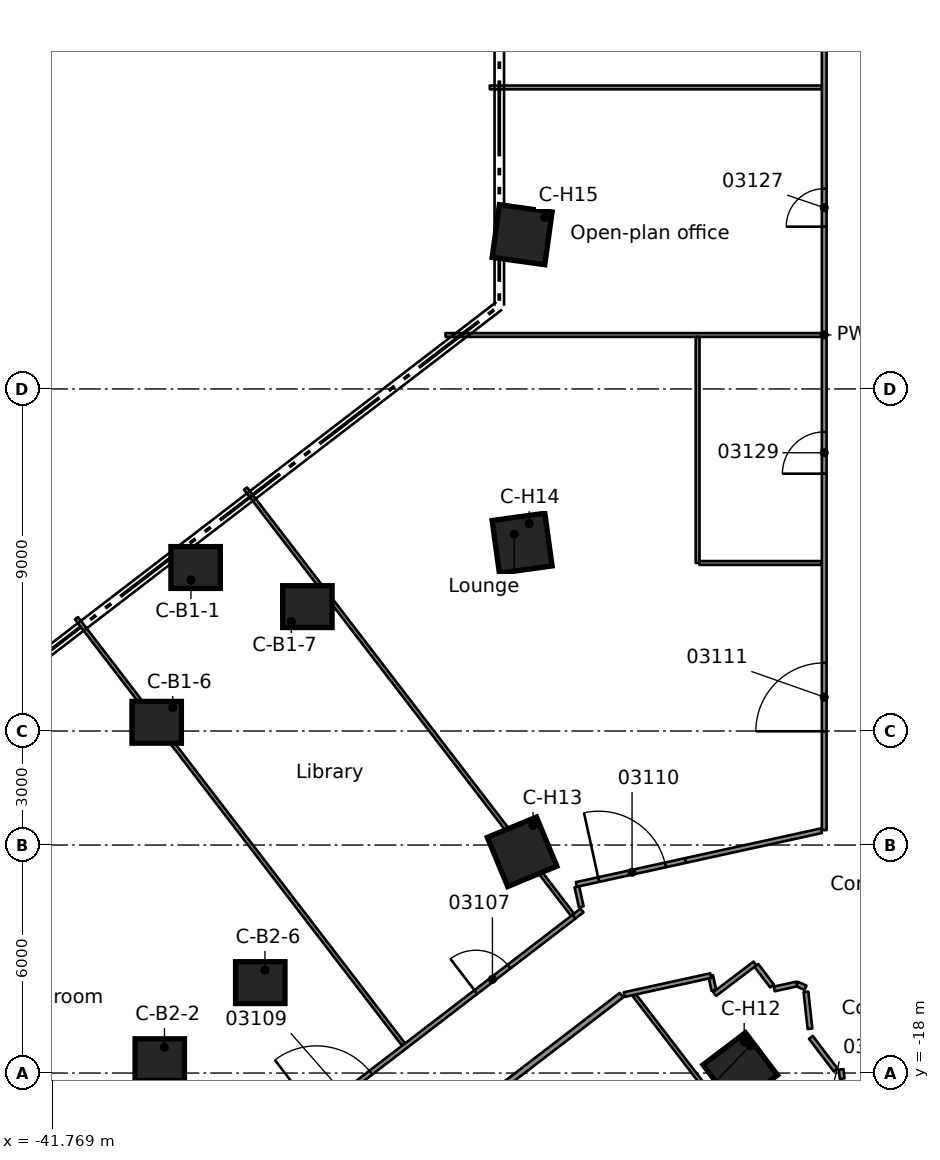
"""IFC4 building model, lengths in metres.
Left out: names, types, materials, properties, quantities, classifications, styles, units other than length and angle.
Written with IfcOpenShell. Run it as: python <this file> out.ifc"""

import sys

from ifc_helpers import new_model, si_unit, direction, frame, frame_2d, origin, origin_2d, place, context, subcontext, project, spatial, rectangle, extrude, element, fill, save


model = new_model("IFC4")
c1 = context("Model", 3, precision=1e-05, world=origin(), true_north=direction((0.0, 1.0)))
c2 = subcontext(c1, "Body", "Model", "MODEL_VIEW")
j1 = project(units=[si_unit("LENGTHUNIT", "METRE"), si_unit("PLANEANGLEUNIT", "RADIAN")], contexts=[c1])
p1 = place(None, origin())
s1 = spatial("IfcSite", under=j1, at=p1, CompositionType="ELEMENT")
p2 = place(p1, origin())
s2 = spatial("IfcBuilding", under=s1, at=p2, CompositionType="ELEMENT")
p3 = place(p2, frame((0.0, 0.0, 15.5)))
s3 = spatial("IfcBuildingStorey", under=s2, at=p3, CompositionType="ELEMENT", Elevation=15.5)
for number, where, z_axis, x_axis in (
    (1, (-37.991, -4.698, 0.0), (0.0, 0.0, 1.0), (1.0, 0.0, 0.0)),
    (2, (-39.016, -8.771, 0.0), (0.0, 0.0, 1.0), (1.0, 0.0, 0.0)),
    (3, (-35.05, -5.727, 0.0), (0.0, 0.0, 1.0), (1.0, 0.0, 0.0)),
    (4, (-38.935, -17.649, 0.0), (0.0, 0.0, 1.0), (1.0, 0.0, 0.0)),
    (5, (-36.29, -15.62, 0.0), (0.0, 0.0, 1.0), (1.0, 0.0, 0.0)),
):
    element("IfcColumn", number, at=place(p3, frame(where, z_axis=z_axis, x_axis=x_axis)), inside=s3, PredefinedType="COLUMN", context=c2, shape_type="SweptSolid", body=[
        extrude(rectangle(XDim=1.3, YDim=1.1, at=origin_2d()), origin(), (0.0, 0.0, 1.0), 5.0),
    ])
for number, where, z_axis, x_axis in (
    (6, (-23.659, -17.919, 0.0), (0.0, 0.0, 1.0), (-0.797, -0.604, 0.0)),
    (7, (-29.4, -12.178, 0.0), (0.0, 0.0, 1.0), (-0.924, -0.383, 0.0)),
    (8, (-29.4, -4.059, 0.0), (0.0, 0.0, 1.0), (-0.991, -0.137, 0.0)),
    (9, (-29.4, 4.059, 0.0), (0.0, 0.0, 1.0), (-0.991, 0.137, 0.0)),
):
    element("IfcColumn", number, at=place(p3, frame(where, z_axis=z_axis, x_axis=x_axis)), inside=s3, PredefinedType="COLUMN", context=c2, shape_type="SweptSolid", body=[
        extrude(rectangle(XDim=1.4, YDim=1.4, at=origin_2d()), origin(), (0.0, 0.0, 1.0), 5.0),
    ])
p4 = place(p3, frame((-21.004, -17.904, 0.0), z_axis=(0.0, 0.0, 1.0), x_axis=(0.105933230141, -0.994373245191, 0.0)))
e10 = element("IfcWall", 10, at=p4, inside=s3, PredefinedType="PARTITIONING", context=c2, shape_type="SweptSolid", body=[
    extrude(rectangle(XDim=0.244, YDim=0.125, at=frame_2d((0.122, 0.0))), origin(), (0.0, 0.0, 1.0), 4.58),
])
p5 = place(p3, frame((-21.931, -15.864, 0.0), z_axis=(0.0, 0.0, 1.0), x_axis=(0.10837572028, -0.99411000561, 0.0)))
e11 = element("IfcWall", 11, at=p5, inside=s3, PredefinedType="PARTITIONING", context=c2, shape_type="SweptSolid", body=[
    extrude(rectangle(XDim=0.978, YDim=0.125, at=frame_2d((0.489, 0.0))), origin(), (0.0, 0.0, 1.0), 4.58),
])
p6 = place(p3, frame((-24.438, -15.437, 0.0), z_axis=(0.0, 0.0, 1.0), x_axis=(0.212096867325, -0.977248647413, 0.0)))
e12 = element("IfcWall", 12, at=p6, inside=s3, PredefinedType="PARTITIONING", context=c2, shape_type="SweptSolid", body=[
    extrude(rectangle(XDim=0.396, YDim=0.125, at=frame_2d((0.198, 0.0))), origin(), (0.0, 0.0, 1.0), 4.58),
])
p7 = place(p3, frame((-27.959, -13.1, 0.0), z_axis=(0.0, 0.0, 1.0), x_axis=(0.215346078447, -0.976537795734, 0.0)))
e13 = element("IfcWall", 13, at=p7, inside=s3, PredefinedType="PARTITIONING", context=c2, shape_type="SweptSolid", body=[
    extrude(rectangle(XDim=0.539, YDim=0.125, at=frame_2d((0.269, 0.0))), origin(), (0.0, 0.0, 1.0), 4.58),
])
p8 = place(p3, frame((-23.234, -15.168, 0.0), z_axis=(0.0, 0.0, 1.0), x_axis=(0.602990949897, -0.797748026849, 0.0)))
e14 = element("IfcWall", 14, at=p8, inside=s3, PredefinedType="PARTITIONING", context=c2, shape_type="SweptSolid", body=[
    extrude(rectangle(XDim=0.678, YDim=0.125, at=frame_2d((0.339, 0.0))), origin(), (0.0, 0.0, 1.0), 4.58),
])
p9 = place(p3, frame((-21.801, -17.061, 0.0), z_axis=(0.0, 0.0, 1.0), x_axis=(0.604123687543, -0.796890563471, 0.0)))
e15 = element("IfcWall", 15, at=p9, inside=s3, PredefinedType="PARTITIONING", context=c2, shape_type="SweptSolid", body=[
    extrude(rectangle(XDim=1.078, YDim=0.125, at=frame_2d((0.539, 0.0))), origin(), (0.0, 0.0, 1.0), 4.58),
])
p10 = place(p3, frame((-41.126, -6.033, 0.0), z_axis=(0.0, 0.0, 1.0), x_axis=(0.608775561638, -0.793342495743, 0.0)))
e16 = element("IfcWall", 16, at=p10, inside=s3, PredefinedType="PARTITIONING", context=c2, shape_type="SweptSolid", body=[
    extrude(rectangle(XDim=14.136, YDim=0.1, at=frame_2d((7.068, 0.0))), origin(), (0.0, 0.0, 1.0), 4.58),
])
p11 = place(p3, frame((-36.678, -2.62, 0.0), z_axis=(0.0, 0.0, 1.0), x_axis=(0.608783902678, -0.793336095132, 0.0)))
e17 = element("IfcWall", 17, at=p11, inside=s3, PredefinedType="PARTITIONING", context=c2, shape_type="SweptSolid", body=[
    extrude(rectangle(XDim=14.136, YDim=0.1, at=frame_2d((7.068, 0.0))), origin(), (0.0, 0.0, 1.0), 4.58),
])
p12 = place(p3, frame((-26.44, -15.962, 0.0), z_axis=(0.0, 0.0, 1.0), x_axis=(0.608697215762, -0.79340260872, 0.0)))
e18 = element("IfcWall", 18, at=p12, inside=s3, PredefinedType="PARTITIONING", context=c2, shape_type="SweptSolid", body=[
    extrude(rectangle(XDim=6.79, YDim=0.1, at=frame_2d((3.395, 0.0))), origin(), (0.0, 0.0, 1.0), 4.58),
])
p13 = place(p3, frame((-22.17, -15.656, 0.0), z_axis=(0.0, 0.0, 1.0), x_axis=(0.914864311429, -0.403761429156, 0.0)))
e19 = element("IfcWall", 19, at=p13, inside=s3, PredefinedType="PARTITIONING", context=c2, shape_type="SweptSolid", body=[
    extrude(rectangle(XDim=0.248, YDim=0.125, at=frame_2d((0.124, 0.0))), origin(), (0.0, 0.0, 1.0), 4.58),
])
p14 = place(p3, frame((-24.732, -4.579, 0.0), z_axis=(0.0, 0.0, 1.0), x_axis=(1.0, 0.0, 0.0)))
e20 = element("IfcWall", 20, at=p14, inside=s3, PredefinedType="PARTITIONING", context=c2, shape_type="SweptSolid", body=[
    extrude(rectangle(XDim=3.22, YDim=0.1, at=frame_2d((1.61, 0.0))), origin(), (0.0, 0.0, 1.0), 4.58),
])
p15 = place(p3, frame((-31.414, 1.42, 0.0), z_axis=(0.0, 0.0, 1.0), x_axis=(1.0, 0.0, 0.0)))
e21 = element("IfcWall", 21, at=p15, inside=s3, PredefinedType="PARTITIONING", context=c2, shape_type="SweptSolid", body=[
    extrude(rectangle(XDim=9.902, YDim=0.1, at=frame_2d((4.951, 0.0))), origin(), (0.0, 0.0, 1.0), 4.58),
])
p16 = place(p3, frame((-30.25, 7.934, 0.0), z_axis=(0.0, 0.0, 1.0), x_axis=(1.0, 0.0, 0.0)))
e22 = element("IfcWall", 22, at=p16, inside=s3, PredefinedType="PARTITIONING", context=c2, shape_type="SweptSolid", body=[
    extrude(rectangle(XDim=8.738, YDim=0.1, at=frame_2d((4.369, 0.0))), origin(), (0.0, 0.0, 1.0), 4.58),
])
p17 = place(p3, frame((-26.712, -15.936, 0.0), z_axis=(0.0, 0.0, 1.0), x_axis=(0.976756126143, 0.214353609817, 0.0)))
e23 = element("IfcWall", 23, at=p17, inside=s3, PredefinedType="PARTITIONING", context=c2, shape_type="SweptSolid", body=[
    extrude(rectangle(XDim=2.328, YDim=0.125, at=frame_2d((1.164, 0.0))), origin(), (0.0, 0.0, 1.0), 4.58),
])
p18 = place(p3, frame((-22.765, -15.787, 0.0), z_axis=(0.0, 0.0, 1.0), x_axis=(0.97657209397, 0.215190486033, 0.0)))
e24 = element("IfcWall", 24, at=p18, inside=s3, PredefinedType="PARTITIONING", context=c2, shape_type="SweptSolid", body=[
    extrude(rectangle(XDim=0.609, YDim=0.125, at=frame_2d((0.305, 0.0))), origin(), (0.0, 0.0, 1.0), 4.58),
])
p19 = place(p3, frame((-25.102, -12.408, 0.0), z_axis=(0.0, 0.0, 1.0), x_axis=(0.976805954505, 0.214126428176, 0.0)))
e25 = element("IfcWall", 25, at=p19, inside=s3, PredefinedType="PARTITIONING", context=c2, shape_type="SweptSolid", body=[
    extrude(rectangle(XDim=3.661, YDim=0.125, at=frame_2d((1.831, 0.0))), origin(), (0.0, 0.0, 1.0), 4.58),
])
p20 = place(p3, frame((-27.972, -13.038, 0.0), z_axis=(0.0, 0.0, 1.0), x_axis=(0.976718013582, 0.214527205604, 0.0)))
e26 = element("IfcWall", 26, at=p20, inside=s3, PredefinedType="PARTITIONING", context=c2, shape_type="SweptSolid", body=[
    extrude(rectangle(XDim=2.937, YDim=0.125, at=frame_2d((1.469, 0.0))), origin(), (0.0, 0.0, 1.0), 4.58),
])
p21 = place(p20, frame((0.6, 0.0, 0.0)))
e27 = element("IfcOpeningElement", 27, at=p21, cuts=e26, PredefinedType="OPENING", context=c2, shape_type="SweptSolid", body=[
    extrude(rectangle(XDim=1.8, YDim=2.1, at=frame_2d((0.9, 1.05))), frame((0.0, 0.073, 0.0), z_axis=(0.0, -1.0, 0.0), x_axis=(1.0, 0.0, 0.0)), (0.0, 0.0, 1.0), 0.145),
])
p22 = place(p3, frame((-24.332, -15.92, 0.0), z_axis=(0.0, 0.0, 1.0), x_axis=(0.797480426333, 0.603344818172, 0.0)))
e28 = element("IfcWall", 28, at=p22, inside=s3, PredefinedType="PARTITIONING", context=c2, shape_type="SweptSolid", body=[
    extrude(rectangle(XDim=1.329, YDim=0.125, at=frame_2d((0.665, 0.0))), origin(), (0.0, 0.0, 1.0), 4.58),
])
p23 = place(p3, frame((-26.787, -15.951, 0.0), z_axis=(0.0, 0.0, 1.0), x_axis=(-0.793270647626, -0.608869181035, 0.0)))
e29 = element("IfcWall", 29, at=p23, inside=s3, PredefinedType="PARTITIONING", context=c2, shape_type="SweptSolid", body=[
    extrude(rectangle(XDim=21.837, YDim=0.15, at=frame_2d((10.919, 0.0))), origin(), (0.0, 0.0, 1.0), 4.58),
])
p24 = place(p23, frame((13.973, 0.0, 0.0)))
e30 = element("IfcOpeningElement", 30, at=p24, cuts=e29, PredefinedType="OPENING", context=c2, shape_type="SweptSolid", body=[
    extrude(rectangle(XDim=0.9, YDim=2.1, at=frame_2d((0.45, 1.05))), frame((0.0, 0.085, 0.0), z_axis=(0.0, -1.0, 0.0), x_axis=(1.0, 0.0, 0.0)), (0.0, 0.0, 1.0), 0.17),
])
p25 = place(p3, frame((-47.476, -28.803, 0.0), z_axis=(0.0, 0.0, 1.0), x_axis=(0.793397382488, 0.608704027801, 0.0)))
e31 = element("IfcWall", 31, at=p25, inside=s3, PredefinedType="PARTITIONING", context=c2, shape_type="SweptSolid", body=[
    extrude(rectangle(XDim=24.506, YDim=0.125, at=frame_2d((12.253, 0.0))), origin(), (0.0, 0.0, 1.0), 4.58),
])
p26 = place(p25, frame((21.249, 0.0, 0.0)))
e32 = element("IfcOpeningElement", 32, at=p26, cuts=e31, PredefinedType="OPENING", context=c2, shape_type="SweptSolid", body=[
    extrude(rectangle(XDim=1.1, YDim=2.1, at=frame_2d((0.55, 1.05))), frame((0.0, 0.073, 0.0), z_axis=(0.0, -1.0, 0.0), x_axis=(1.0, 0.0, 0.0)), (0.0, 0.0, 1.0), 0.145),
])
p27 = place(p25, frame((8.75, 0.0, 0.0)))
e33 = element("IfcOpeningElement", 33, at=p27, cuts=e31, PredefinedType="OPENING", context=c2, shape_type="SweptSolid", body=[
    extrude(rectangle(XDim=1.8, YDim=2.1, at=frame_2d((0.9, 1.05))), frame((0.0, 0.073, 0.0), z_axis=(0.0, -1.0, 0.0), x_axis=(1.0, 0.0, 0.0)), (0.0, 0.0, 1.0), 0.145),
])
p28 = place(p25, frame((15.965, 0.0, 0.0)))
e34 = element("IfcOpeningElement", 34, at=p28, cuts=e31, PredefinedType="OPENING", context=c2, shape_type="SweptSolid", body=[
    extrude(rectangle(XDim=1.8, YDim=2.1, at=frame_2d((0.9, 1.05))), frame((0.0, 0.073, 0.0), z_axis=(0.0, -1.0, 0.0), x_axis=(1.0, 0.0, 0.0)), (0.0, 0.0, 1.0), 0.145),
])
p29 = place(p3, frame((-28.034, -13.885, 0.0), z_axis=(0.0, 0.0, 1.0), x_axis=(0.792488206653, 0.609887237378, 0.0)))
e35 = element("IfcWall", 35, at=p29, inside=s3, PredefinedType="PARTITIONING", context=c2, shape_type="SweptSolid", body=[
    extrude(rectangle(XDim=0.267, YDim=0.125, at=frame_2d((0.134, 0.0))), origin(), (0.0, 0.0, 1.0), 4.58),
])
p30 = place(p3, frame((-21.45, -11.607, 0.0), z_axis=(0.0, 0.0, 1.0), x_axis=(0.0, 1.0, 0.0)))
e36 = element("IfcWall", 36, at=p30, inside=s3, PredefinedType="PARTITIONING", context=c2, shape_type="SweptSolid", body=[
    extrude(rectangle(XDim=26.058, YDim=0.125, at=frame_2d((13.029, 0.0))), origin(), (0.0, 0.0, 1.0), 4.58),
])
p31 = place(p30, frame((2.6, 0.0, 0.0)))
e37 = element("IfcOpeningElement", 37, at=p31, cuts=e36, PredefinedType="OPENING", context=c2, shape_type="SweptSolid", body=[
    extrude(rectangle(XDim=1.8, YDim=2.1, at=frame_2d((0.9, 1.05))), frame((0.0, 0.073, 0.0), z_axis=(0.0, -1.0, 0.0), x_axis=(1.0, 0.0, 0.0)), (0.0, 0.0, 1.0), 0.145),
])
p32 = place(p30, frame((22.391, 0.0, 0.0)))
e38 = element("IfcOpeningElement", 38, at=p32, cuts=e36, PredefinedType="OPENING", context=c2, shape_type="SweptSolid", body=[
    extrude(rectangle(XDim=0.9, YDim=2.1, at=frame_2d((0.45, 1.05))), frame((0.0, 0.073, 0.0), z_axis=(0.0, -1.0, 0.0), x_axis=(1.0, 0.0, 0.0)), (0.0, 0.0, 1.0), 0.145),
])
p33 = place(p30, frame((15.877, 0.0, 0.0)))
e39 = element("IfcOpeningElement", 39, at=p33, cuts=e36, PredefinedType="OPENING", context=c2, shape_type="SweptSolid", body=[
    extrude(rectangle(XDim=1.0, YDim=2.1, at=frame_2d((0.5, 1.05))), frame((0.0, 0.073, 0.0), z_axis=(0.0, -1.0, 0.0), x_axis=(1.0, 0.0, 0.0)), (0.0, 0.0, 1.0), 0.145),
])
p34 = place(p30, frame((9.378, 0.0, 0.0)))
e40 = element("IfcOpeningElement", 40, at=p34, cuts=e36, PredefinedType="OPENING", context=c2, shape_type="SweptSolid", body=[
    extrude(rectangle(XDim=1.1, YDim=2.1, at=frame_2d((0.55, 1.05))), frame((0.0, 0.073, 0.0), z_axis=(0.0, -1.0, 0.0), x_axis=(1.0, 0.0, 0.0)), (0.0, 0.0, 1.0), 0.145),
])
p35 = place(p3, frame((-24.782, -4.579, 0.0), z_axis=(0.0, 0.0, 1.0), x_axis=(0.0, 1.0, 0.0)))
e41 = element("IfcWall", 41, at=p35, inside=s3, PredefinedType="PARTITIONING", context=c2, shape_type="SweptSolid", body=[
    extrude(rectangle(XDim=5.949, YDim=0.1, at=frame_2d((2.975, 0.0))), origin(), (0.0, 0.0, 1.0), 4.58),
])
p36 = place(p26, origin())
e42 = element("IfcDoor", 42, at=p36, inside=s3, OperationType="SINGLE_SWING_RIGHT", PredefinedType="DOOR", context=c2, shape_type="SweptSolid", body=[
    extrude(rectangle(XDim=1.1, YDim=2.1, at=frame_2d((0.55, 1.05))), frame((0.0, 0.025, 0.0), z_axis=(0.0, -1.0, 0.0), x_axis=(1.0, 0.0, 0.0)), (0.0, 0.0, 1.0), 0.05),
])
fill(e32, e42)
p37 = place(p28, origin())
e43 = element("IfcDoor", 43, at=p37, inside=s3, OperationType="DOUBLE_DOOR_SINGLE_SWING", PredefinedType="DOOR", context=c2, shape_type="SweptSolid", body=[
    extrude(rectangle(XDim=1.8, YDim=2.1, at=frame_2d((0.9, 1.05))), frame((0.0, 0.025, 0.0), z_axis=(0.0, -1.0, 0.0), x_axis=(1.0, 0.0, 0.0)), (0.0, 0.0, 1.0), 0.05),
])
fill(e34, e43)
p38 = place(p21, origin())
e44 = element("IfcDoor", 44, at=p38, inside=s3, OperationType="DOUBLE_DOOR_SINGLE_SWING", PredefinedType="DOOR", context=c2, shape_type="SweptSolid", body=[
    extrude(rectangle(XDim=1.8, YDim=2.1, at=frame_2d((0.9, 1.05))), frame((0.0, 0.025, 0.0), z_axis=(0.0, -1.0, 0.0), x_axis=(1.0, 0.0, 0.0)), (0.0, 0.0, 1.0), 0.05),
])
fill(e27, e44)
p39 = place(p31, origin())
e45 = element("IfcDoor", 45, at=p39, inside=s3, OperationType="DOUBLE_DOOR_SINGLE_SWING", PredefinedType="DOOR", context=c2, shape_type="SweptSolid", body=[
    extrude(rectangle(XDim=1.8, YDim=2.1, at=frame_2d((0.9, 1.05))), frame((0.0, 0.025, 0.0), z_axis=(0.0, -1.0, 0.0), x_axis=(1.0, 0.0, 0.0)), (0.0, 0.0, 1.0), 0.05),
])
fill(e37, e45)
p40 = place(p33, origin())
e46 = element("IfcDoor", 46, at=p40, inside=s3, OperationType="SINGLE_SWING_RIGHT", PredefinedType="DOOR", context=c2, shape_type="SweptSolid", body=[
    extrude(rectangle(XDim=1.0, YDim=2.1, at=frame_2d((0.5, 1.05))), frame((0.0, 0.025, 0.0), z_axis=(0.0, -1.0, 0.0), x_axis=(1.0, 0.0, 0.0)), (0.0, 0.0, 1.0), 0.05),
])
fill(e39, e46)
p41 = place(p34, origin())
e47 = element("IfcDoor", 47, at=p41, inside=s3, OperationType="SINGLE_SWING_LEFT", PredefinedType="DOOR", context=c2, shape_type="SweptSolid", body=[
    extrude(rectangle(XDim=1.1, YDim=2.1, at=frame_2d((0.55, 1.05))), frame((0.0, 0.025, 0.0), z_axis=(0.0, -1.0, 0.0), x_axis=(1.0, 0.0, 0.0)), (0.0, 0.0, 1.0), 0.05),
])
fill(e40, e47)
save(model, sys.argv[1])
